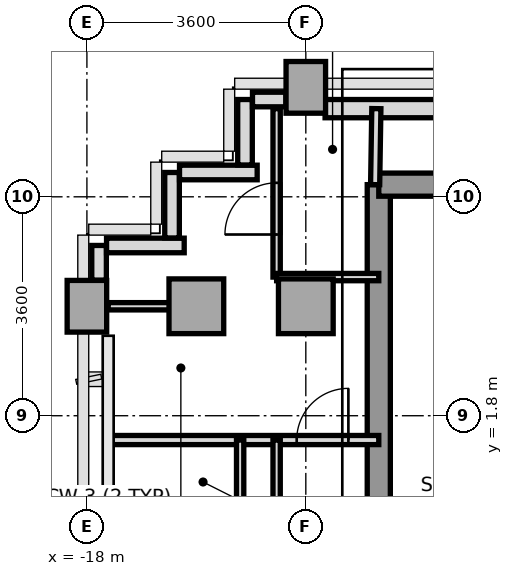
"""IFC4 building model, lengths in metres.
Left out: names, types, materials, properties, quantities, classifications, styles, units other than length and angle.
Written with IfcOpenShell. Run it as: python <this file> out.ifc"""

import sys

from ifc_helpers import new_model, si_unit, direction, frame, frame_2d, origin, origin_2d, place, context, subcontext, project, spatial, rectangle, extrude, source, transform, mapped, element, fill, save


model = new_model("IFC4")
c1 = context("Model", 3, precision=1e-05, world=origin(), true_north=direction((0.0, 1.0)))
c2 = subcontext(c1, "Body", "Model", "MODEL_VIEW")
j1 = project(units=[si_unit("LENGTHUNIT", "METRE"), si_unit("PLANEANGLEUNIT", "RADIAN")], contexts=[c1])
p1 = place(None, origin())
s1 = spatial("IfcSite", under=j1, at=p1, CompositionType="ELEMENT")
p2 = place(p1, origin())
s2 = spatial("IfcBuilding", under=s1, at=p2, CompositionType="ELEMENT")
p3 = place(p2, frame((0.0, 0.0, 191.0)))
s3 = spatial("IfcBuildingStorey", under=s2, at=p3, CompositionType="ELEMENT", Elevation=191.0)
m1 = source(origin(), c2, "Body", "SweptSolid", [
    extrude(rectangle(XDim=0.65, YDim=0.85, at=origin_2d()), origin(), (0.0, 0.0, 1.0), 3.2),
])
p4 = place(p3, frame((-18.0, 3.6, 0.0), z_axis=(0.0, 0.0, 1.0), x_axis=(1.0, 0.0, 0.0)))
e1 = element("IfcColumn", 1, at=p4, inside=s3, PredefinedType="COLUMN", context=c2, shape_type="MappedRepresentation", body=[
    mapped(m1, transform((0.0, 0.0, 0.0), x_axis=(1.0, 0.0, 0.0), y_axis=(0.0, 1.0, 0.0), z_axis=(0.0, 0.0, 1.0), scale=1.0)),
])
m2 = source(origin(), c2, "Body", "SweptSolid", [
    extrude(rectangle(XDim=0.9, YDim=0.9, at=origin_2d()), origin(), (0.0, 0.0, 1.0), 3.2),
])
for number, where, z_axis, x_axis in (
    (2, (-16.2, 3.6, 0.0), (0.0, 0.0, 1.0), (1.0, 0.0, 0.0)),
    (3, (-14.4, 3.6, 0.0), (0.0, 0.0, 1.0), (1.0, 0.0, 0.0)),
):
    element("IfcColumn", number, at=place(p3, frame(where, z_axis=z_axis, x_axis=x_axis)), inside=s3, PredefinedType="COLUMN", context=c2, shape_type="MappedRepresentation", body=[
        mapped(m2, transform((0.0, 0.0, 0.0), x_axis=(1.0, 0.0, 0.0), y_axis=(0.0, 1.0, 0.0), z_axis=(0.0, 0.0, 1.0), scale=1.0)),
    ])
p5 = place(p3, frame((-14.4, 7.2, 0.0), z_axis=(0.0, 0.0, 1.0), x_axis=(1.0, 0.0, 0.0)))
e4 = element("IfcColumn", 4, at=p5, inside=s3, PredefinedType="COLUMN", context=c2, shape_type="MappedRepresentation", body=[
    mapped(m1, transform((0.0, 0.0, 0.0), x_axis=(1.0, 0.0, 0.0), y_axis=(0.0, 1.0, 0.0), z_axis=(0.0, 0.0, 1.0), scale=1.0)),
])
p6 = place(p3, frame((-14.083, 6.85, 0.0), z_axis=(0.0, 0.0, 1.0), x_axis=(1.0, 0.0, 0.0)))
e5 = element("IfcWall", 5, at=p6, inside=s3, PredefinedType="SOLIDWALL", context=c2, shape_type="SweptSolid", body=[
    extrude(rectangle(XDim=2.635, YDim=0.3, at=frame_2d((1.317, 0.0))), origin(), (0.0, 0.0, 1.0), 3.2),
])
p7 = place(p3, frame((-17.8, 4.028, 0.0), z_axis=(0.0, 0.0, 1.0), x_axis=(0.0, 1.0, 0.0)))
e6 = element("IfcWall", 6, at=p7, inside=s3, PredefinedType="PARAPET", context=c2, shape_type="SweptSolid", body=[
    extrude(rectangle(XDim=0.572, YDim=0.24, at=frame_2d((0.286, 0.0))), origin(), (0.0, 0.0, 1.0), 1.15),
])
p8 = place(p3, frame((-17.677, 4.6, 0.0), z_axis=(0.0, 0.0, 1.0), x_axis=(1.0, 0.0, 0.0)))
e7 = element("IfcWall", 7, at=p8, inside=s3, PredefinedType="PARAPET", context=c2, shape_type="SweptSolid", body=[
    extrude(rectangle(XDim=1.277, YDim=0.24, at=frame_2d((0.639, 0.0))), origin(), (0.0, 0.0, 1.0), 1.15),
])
p9 = place(p3, frame((-16.6, 4.723, 0.0), z_axis=(0.0, 0.0, 1.0), x_axis=(0.0, 1.0, 0.0)))
e8 = element("IfcWall", 8, at=p9, inside=s3, PredefinedType="PARAPET", context=c2, shape_type="SweptSolid", body=[
    extrude(rectangle(XDim=1.077, YDim=0.24, at=frame_2d((0.539, 0.0))), origin(), (0.0, 0.0, 1.0), 1.15),
])
p10 = place(p3, frame((-16.477, 5.8, 0.0), z_axis=(0.0, 0.0, 1.0), x_axis=(1.0, 0.0, 0.0)))
e9 = element("IfcWall", 9, at=p10, inside=s3, PredefinedType="PARAPET", context=c2, shape_type="SweptSolid", body=[
    extrude(rectangle(XDim=1.277, YDim=0.24, at=frame_2d((0.639, 0.0))), origin(), (0.0, 0.0, 1.0), 1.15),
])
p11 = place(p3, frame((-15.4, 5.923, 0.0), z_axis=(0.0, 0.0, 1.0), x_axis=(0.0, 1.0, 0.0)))
e10 = element("IfcWall", 10, at=p11, inside=s3, PredefinedType="PARAPET", context=c2, shape_type="SweptSolid", body=[
    extrude(rectangle(XDim=1.077, YDim=0.24, at=frame_2d((0.539, 0.0))), origin(), (0.0, 0.0, 1.0), 1.15),
])
p12 = place(p3, frame((-15.277, 7.0, 0.0), z_axis=(0.0, 0.0, 1.0), x_axis=(1.0, 0.0, 0.0)))
e11 = element("IfcWall", 11, at=p12, inside=s3, PredefinedType="PARAPET", context=c2, shape_type="SweptSolid", body=[
    extrude(rectangle(XDim=0.549, YDim=0.24, at=frame_2d((0.274, 0.0))), origin(), (0.0, 0.0, 1.0), 1.15),
])
p13 = place(p3, frame((-13.2, -5.6, 0.0), z_axis=(0.0, 0.0, 1.0), x_axis=(0.0, 1.0, 0.0)))
e12 = element("IfcWall", 12, at=p13, inside=s3, PredefinedType="SHEAR", context=c2, shape_type="SweptSolid", body=[
    extrude(rectangle(XDim=11.2, YDim=0.38, at=frame_2d((5.6, 0.0))), origin(), (0.0, 0.0, 1.0), 3.2),
])
p14 = place(p3, frame((-13.2, 5.6, 0.0), z_axis=(0.0, 0.0, 1.0), x_axis=(1.0, 0.0, 0.0)))
e13 = element("IfcWall", 13, at=p14, inside=s3, PredefinedType="SHEAR", context=c2, shape_type="SweptSolid", body=[
    extrude(rectangle(XDim=1.844, YDim=0.38, at=frame_2d((0.922, 0.0))), origin(), (0.0, 0.0, 1.0), 3.2),
])
p15 = place(p3, frame((-13.26, 5.6, 0.0), z_axis=(0.0, 0.0, 1.0), x_axis=(0.016013571389, 0.999871774545, 0.0)))
e14 = element("IfcWall", 14, at=p15, inside=s3, PredefinedType="PARTITIONING", context=c2, shape_type="SweptSolid", body=[
    extrude(rectangle(XDim=1.25, YDim=0.15, at=frame_2d((0.625, 0.0))), origin(), (0.0, 0.0, 1.0), 3.2),
])
p16 = place(p3, frame((-17.65, 1.4, 0.0), z_axis=(0.0, 0.0, 1.0), x_axis=(1.0, 0.0, 0.0)))
e15 = element("IfcWall", 15, at=p16, inside=s3, PredefinedType="PARTITIONING", context=c2, shape_type="SweptSolid", body=[
    extrude(rectangle(XDim=4.45, YDim=0.15, at=frame_2d((2.225, 0.0))), origin(), (0.0, 0.0, 1.0), 2.8),
])
p17 = place(p16, frame((3.1, 0.0, 0.0)))
e16 = element("IfcOpeningElement", 16, at=p17, cuts=e15, PredefinedType="OPENING", context=c2, shape_type="SweptSolid", body=[
    extrude(rectangle(XDim=0.85, YDim=2.1, at=frame_2d((0.425, 1.05))), frame((0.0, 0.085, 0.0), z_axis=(0.0, -1.0, 0.0), x_axis=(1.0, 0.0, 0.0)), (0.0, 0.0, 1.0), 0.17),
])
p18 = place(p3, frame((-17.65, 3.6, 0.0), z_axis=(0.0, 0.0, 1.0), x_axis=(1.0, 0.0, 0.0)))
e17 = element("IfcWall", 17, at=p18, inside=s3, PredefinedType="PARTITIONING", context=c2, shape_type="SweptSolid", body=[
    extrude(rectangle(XDim=1.45, YDim=0.12, at=frame_2d((0.725, 0.0))), origin(), (0.0, 0.0, 1.0), 3.2),
])
p19 = place(p3, frame((-14.88, -6.85, 0.0), z_axis=(0.0, 0.0, 1.0), x_axis=(0.0, 1.0, 0.0)))
e18 = element("IfcWall", 18, at=p19, inside=s3, PredefinedType="PARTITIONING", context=c2, shape_type="SweptSolid", body=[
    extrude(rectangle(XDim=8.25, YDim=0.12, at=frame_2d((4.125, 0.0))), origin(), (0.0, 0.0, 1.0), 3.2),
])
p20 = place(p19, frame((1.2, 0.0, 0.0)))
e19 = element("IfcOpeningElement", 19, at=p20, cuts=e18, PredefinedType="OPENING", context=c2, shape_type="SweptSolid", body=[
    extrude(rectangle(XDim=0.95, YDim=2.15, at=frame_2d((0.475, 1.075))), frame((0.0, 0.07, 0.0), z_axis=(0.0, -1.0, 0.0), x_axis=(1.0, 0.0, 0.0)), (0.0, 0.0, 1.0), 0.14),
])
p21 = place(p3, frame((-15.48, -0.82, 0.0), z_axis=(0.0, 0.0, 1.0), x_axis=(0.0, 1.0, 0.0)))
e20 = element("IfcWall", 20, at=p21, inside=s3, PredefinedType="PARTITIONING", context=c2, shape_type="SweptSolid", body=[
    extrude(rectangle(XDim=2.22, YDim=0.12, at=frame_2d((1.11, 0.0))), origin(), (0.0, 0.0, 1.0), 3.2),
])
p22 = place(p3, frame((-14.88, 4.08, 0.0), z_axis=(0.0, 0.0, 1.0), x_axis=(0.0, 1.0, 0.0)))
e21 = element("IfcWall", 21, at=p22, inside=s3, PredefinedType="PARTITIONING", context=c2, shape_type="SweptSolid", body=[
    extrude(rectangle(XDim=2.77, YDim=0.12, at=frame_2d((1.385, 0.0))), origin(), (0.0, 0.0, 1.0), 3.2),
])
p23 = place(p22, frame((0.7, 0.0, 0.0)))
e22 = element("IfcOpeningElement", 22, at=p23, cuts=e21, PredefinedType="OPENING", context=c2, shape_type="SweptSolid", body=[
    extrude(rectangle(XDim=0.85, YDim=2.1, at=frame_2d((0.425, 1.05))), frame((0.0, 0.07, 0.0), z_axis=(0.0, -1.0, 0.0), x_axis=(1.0, 0.0, 0.0)), (0.0, 0.0, 1.0), 0.14),
])
p24 = place(p3, frame((-14.88, 4.08, 0.0), z_axis=(0.0, 0.0, 1.0), x_axis=(1.0, 0.0, 0.0)))
e23 = element("IfcWall", 23, at=p24, inside=s3, PredefinedType="PARTITIONING", context=c2, shape_type="SweptSolid", body=[
    extrude(rectangle(XDim=1.68, YDim=0.12, at=frame_2d((0.84, 0.0))), origin(), (0.0, 0.0, 1.0), 2.8),
])
m3 = source(origin(), c2, "Body", "SweptSolid", [
    extrude(rectangle(XDim=0.85, YDim=2.1, at=frame_2d((0.425, 1.05))), frame((0.0, 0.025, 0.0), z_axis=(0.0, -1.0, 0.0), x_axis=(1.0, 0.0, 0.0)), (0.0, 0.0, 1.0), 0.05),
])
p25 = place(p23, origin())
e24 = element("IfcDoor", 24, at=p25, inside=s3, OperationType="SINGLE_SWING_LEFT", PredefinedType="DOOR", context=c2, shape_type="MappedRepresentation", body=[
    mapped(m3, transform((0.0, 0.0, 0.0), x_axis=(1.0, 0.0, 0.0), y_axis=(0.0, 1.0, 0.0), z_axis=(0.0, 0.0, 1.0), scale=1.0)),
])
fill(e22, e24)
p26 = place(p17, origin())
e25 = element("IfcDoor", 25, at=p26, inside=s3, OperationType="SINGLE_SWING_RIGHT", PredefinedType="DOOR", context=c2, shape_type="MappedRepresentation", body=[
    mapped(m3, transform((0.0, 0.0, 0.0), x_axis=(1.0, 0.0, 0.0), y_axis=(0.0, 1.0, 0.0), z_axis=(0.0, 0.0, 1.0), scale=1.0)),
])
fill(e16, e25)
save(model, sys.argv[1])
